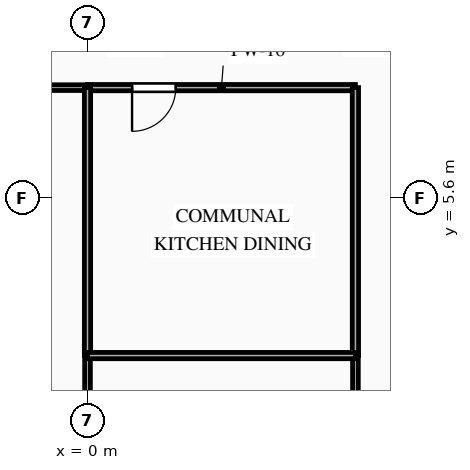
"""IFC4 building model, lengths in metres.
Left out: names, types, materials, properties, quantities, classifications, styles, units other than length and angle.
Written with IfcOpenShell. Run it as: python <this file> out.ifc"""

import sys

from ifc_helpers import new_model, si_unit, direction, frame, frame_2d, origin, place, context, subcontext, project, spatial, rectangle, extrude, element, fill, save


model = new_model("IFC4")
c1 = context("Model", 3, precision=1e-05, world=origin(), true_north=direction((0.0, 1.0)))
c2 = subcontext(c1, "Body", "Model", "MODEL_VIEW")
j1 = project(units=[si_unit("LENGTHUNIT", "METRE"), si_unit("PLANEANGLEUNIT", "RADIAN")], contexts=[c1])
p1 = place(None, origin())
s1 = spatial("IfcSite", under=j1, at=p1, CompositionType="ELEMENT")
p2 = place(p1, origin())
s2 = spatial("IfcBuilding", under=s1, at=p2, CompositionType="ELEMENT")
p3 = place(p2, frame((0.0, 0.0, 82.35)))
s3 = spatial("IfcBuildingStorey", under=s2, at=p3, CompositionType="ELEMENT", Elevation=82.35)
p4 = place(p3, frame((0.0, 8.5, 0.0), z_axis=(0.0, 0.0, 1.0), x_axis=(-1.0, 0.0, 0.0)))
e1 = element("IfcWall", 1, at=p4, inside=s3, PredefinedType="PARTITIONING", context=c2, shape_type="SweptSolid", body=[
    extrude(rectangle(XDim=7.05, YDim=0.15, at=frame_2d((3.525, 0.0))), origin(), (0.0, 0.0, 1.0), 3.045),
])
p5 = place(p3, frame((7.05, 8.5, 0.0), z_axis=(0.0, 0.0, 1.0), x_axis=(-1.0, 0.0, 0.0)))
e2 = element("IfcWall", 2, at=p5, inside=s3, PredefinedType="PARTITIONING", context=c2, shape_type="SweptSolid", body=[
    extrude(rectangle(XDim=7.05, YDim=0.165, at=frame_2d((3.525, 0.0))), origin(), (0.0, 0.0, 1.0), 3.045),
])
p6 = place(p5, frame((4.728, 0.0, 0.0)))
e3 = element("IfcOpeningElement", 3, at=p6, cuts=e2, PredefinedType="OPENING", context=c2, shape_type="SweptSolid", body=[
    extrude(rectangle(XDim=1.15, YDim=2.15, at=frame_2d((0.575, 1.075))), frame((0.0, 0.093, 0.0), z_axis=(0.0, -1.0, 0.0), x_axis=(1.0, 0.0, 0.0)), (0.0, 0.0, 1.0), 0.185),
])
p7 = place(p3, frame((7.05, -5.6, 0.0), z_axis=(0.0, 0.0, 1.0), x_axis=(0.0, 1.0, 0.0)))
e4 = element("IfcWall", 4, at=p7, inside=s3, PredefinedType="PARTITIONING", context=c2, shape_type="SweptSolid", body=[
    extrude(rectangle(XDim=7.05, YDim=0.15, at=frame_2d((3.525, 0.0))), origin(), (0.0, 0.0, 1.0), 3.045),
])
p8 = place(p3, frame((7.05, 1.45, 0.0), z_axis=(0.0, 0.0, 1.0), x_axis=(0.0, 1.0, 0.0)))
e5 = element("IfcWall", 5, at=p8, inside=s3, PredefinedType="PARTITIONING", context=c2, shape_type="SweptSolid", body=[
    extrude(rectangle(XDim=7.05, YDim=0.165, at=frame_2d((3.525, 0.0))), origin(), (0.0, 0.0, 1.0), 3.045),
])
p9 = place(p3, frame((0.0, 1.45, 0.0), z_axis=(0.0, 0.0, 1.0), x_axis=(0.0, -1.0, 0.0)))
e6 = element("IfcWall", 6, at=p9, inside=s3, PredefinedType="PARTITIONING", context=c2, shape_type="SweptSolid", body=[
    extrude(rectangle(XDim=7.05, YDim=0.15, at=frame_2d((3.525, 0.0))), origin(), (0.0, 0.0, 1.0), 3.045),
])
for number, where, z_axis, x_axis in (
    (7, (0.0, 8.5, 0.0), (0.0, 0.0, 1.0), (0.0, -1.0, 0.0)),
    (8, (0.0, 1.45, 0.0), (0.0, 0.0, 1.0), (1.0, 0.0, 0.0)),
):
    element("IfcWall", number, at=place(p3, frame(where, z_axis=z_axis, x_axis=x_axis)), inside=s3, PredefinedType="PARTITIONING", context=c2, shape_type="SweptSolid", body=[
        extrude(rectangle(XDim=7.05, YDim=0.165, at=frame_2d((3.525, 0.0))), origin(), (0.0, 0.0, 1.0), 3.045),
    ])
p10 = place(p6, origin())
e9 = element("IfcDoor", 9, at=p10, inside=s3, OperationType="SINGLE_SWING_RIGHT", PredefinedType="DOOR", context=c2, shape_type="SweptSolid", body=[
    extrude(rectangle(XDim=1.15, YDim=2.15, at=frame_2d((0.575, 1.075))), frame((0.0, 0.025, 0.0), z_axis=(0.0, -1.0, 0.0), x_axis=(1.0, 0.0, 0.0)), (0.0, 0.0, 1.0), 0.05),
])
fill(e3, e9)
save(model, sys.argv[1])
